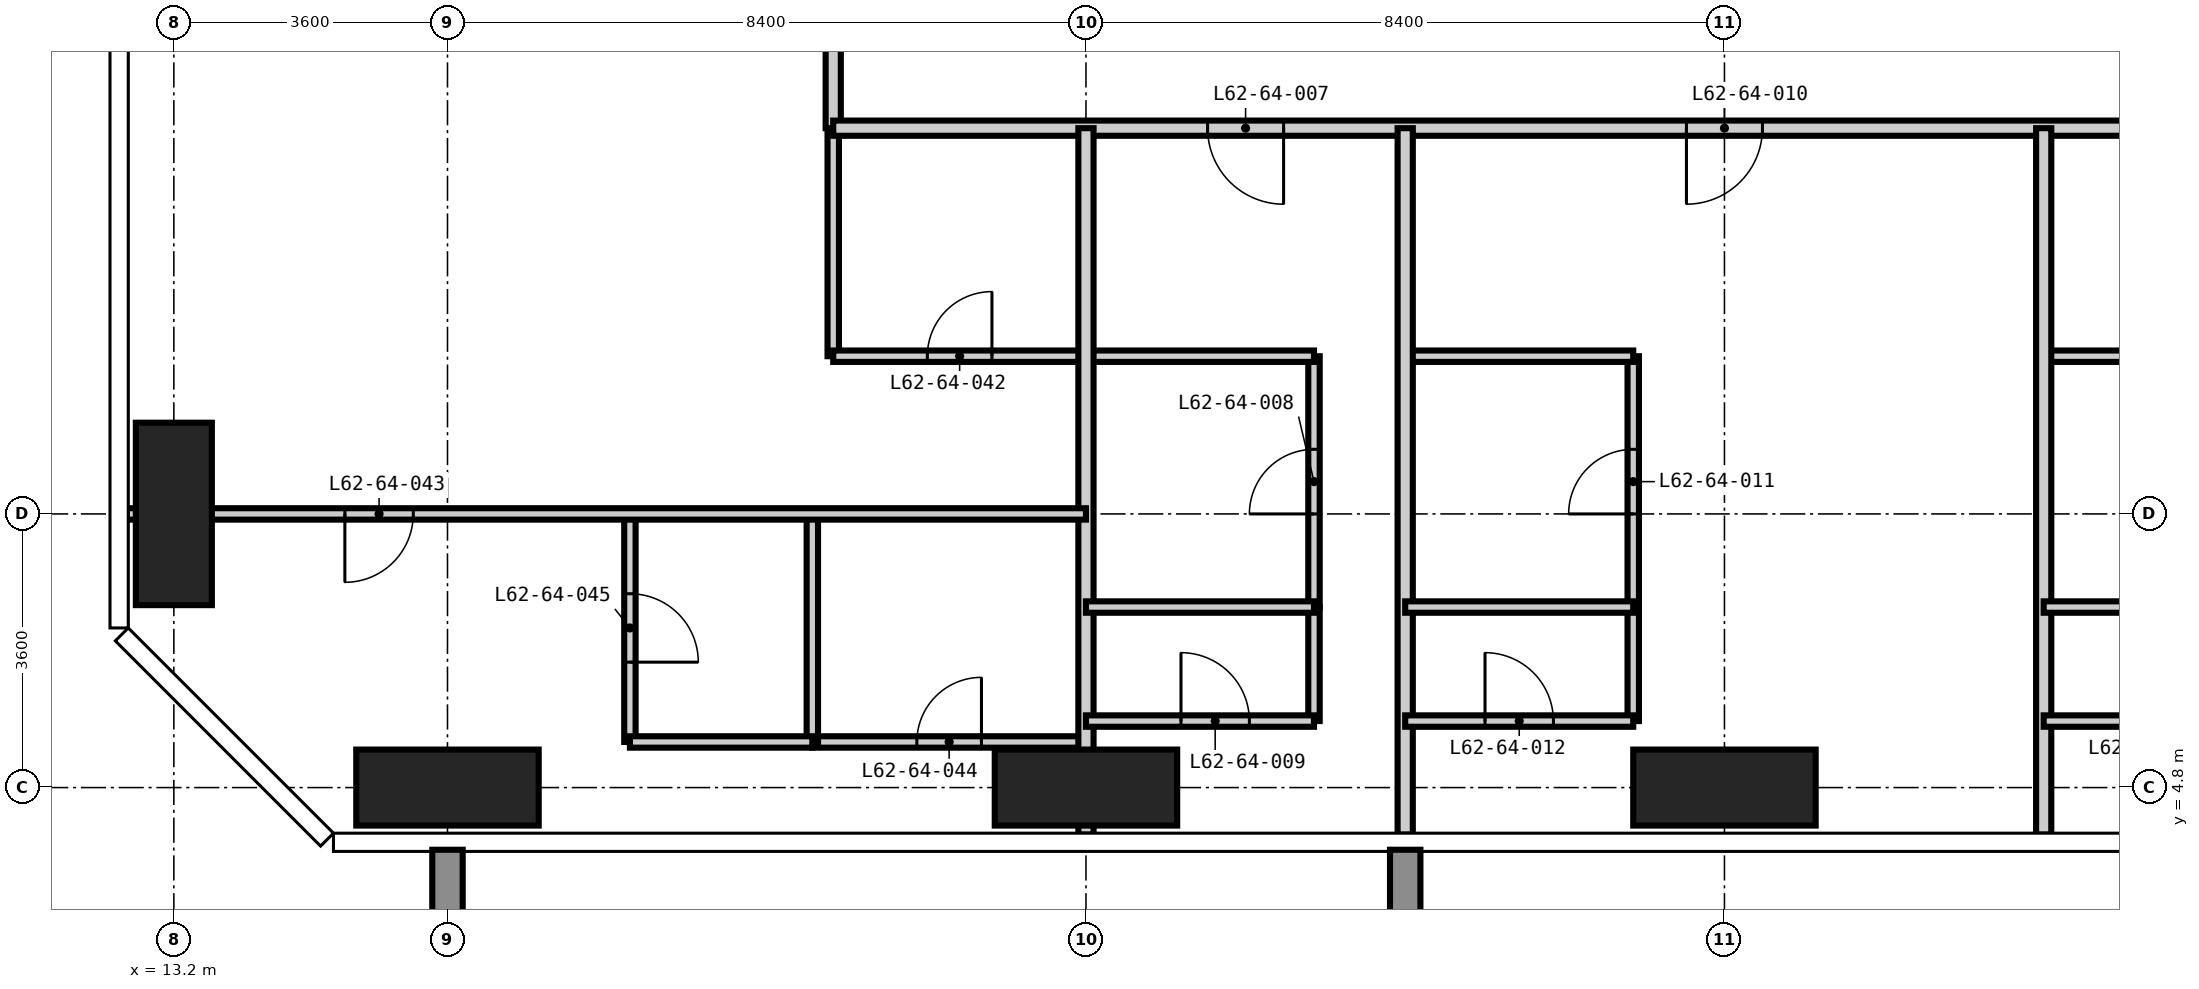
"""IFC4 building model, lengths in metres.
Left out: names, types, materials, properties, quantities, classifications, styles, units other than length and angle.
Written with IfcOpenShell. Run it as: python <this file> out.ifc"""

import sys

from ifc_helpers import new_model, si_unit, direction, frame, frame_2d, origin, origin_2d, place, context, subcontext, project, spatial, rectangle, extrude, element, fill, save


model = new_model("IFC4")
c1 = context("Model", 3, precision=1e-05, world=origin(), true_north=direction((0.0, 1.0)))
c2 = subcontext(c1, "Body", "Model", "MODEL_VIEW")
j1 = project(units=[si_unit("LENGTHUNIT", "METRE"), si_unit("PLANEANGLEUNIT", "RADIAN")], contexts=[c1])
p1 = place(None, origin())
s1 = spatial("IfcSite", under=j1, at=p1, CompositionType="ELEMENT")
p2 = place(p1, origin())
s2 = spatial("IfcBuilding", under=s1, at=p2, CompositionType="ELEMENT")
p3 = place(p2, frame((0.0, 0.0, 241.2)))
s3 = spatial("IfcBuildingStorey", under=s2, at=p3, CompositionType="ELEMENT", Elevation=241.2)
p4 = place(p3, frame((13.2, 8.4, -0.35), z_axis=(0.0, 0.0, 1.0), x_axis=(1.0, 0.0, 0.0)))
e1 = element("IfcColumn", 1, at=p4, inside=s3, PredefinedType="COLUMN", context=c2, shape_type="SweptSolid", body=[
    extrude(rectangle(XDim=1.0, YDim=2.4, at=origin_2d()), origin(), (0.0, 0.0, 1.0), 3.9),
])
for number, where, z_axis, x_axis in (
    (2, (16.8, 4.8, -0.35), (0.0, 0.0, 1.0), (1.0, 0.0, 0.0)),
    (3, (25.2, 4.8, -0.35), (0.0, 0.0, 1.0), (1.0, 0.0, 0.0)),
    (4, (33.6, 4.8, -0.35), (0.0, 0.0, 1.0), (1.0, 0.0, 0.0)),
):
    element("IfcColumn", number, at=place(p3, frame(where, z_axis=z_axis, x_axis=x_axis)), inside=s3, PredefinedType="COLUMN", context=c2, shape_type="SweptSolid", body=[
        extrude(rectangle(XDim=2.4, YDim=1.0, at=origin_2d()), origin(), (0.0, 0.0, 1.0), 3.9),
    ])
p5 = place(p3, frame((21.875, 10.475, 0.0), z_axis=(0.0, 0.0, 1.0), x_axis=(0.0, 1.0, 0.0)))
e5 = element("IfcWall", 5, at=p5, inside=s3, PredefinedType="PARTITIONING", context=c2, shape_type="SweptSolid", body=[
    extrude(rectangle(XDim=3.0, YDim=0.15, at=frame_2d((1.5, 0.0))), origin(), (0.0, 0.0, 1.0), 3.55),
])
p6 = place(p3, frame((28.2, 7.175, 0.0), z_axis=(0.0, 0.0, 1.0), x_axis=(0.0, 1.0, 0.0)))
e6 = element("IfcWall", 6, at=p6, inside=s3, PredefinedType="PARTITIONING", context=c2, shape_type="SweptSolid", body=[
    extrude(rectangle(XDim=3.3, YDim=0.15, at=frame_2d((1.65, 0.0))), origin(), (0.0, 0.0, 1.0), 3.55),
])
p7 = place(p6, frame((1.225, 0.0, 0.0)))
e7 = element("IfcOpeningElement", 7, at=p7, cuts=e6, PredefinedType="OPENING", context=c2, shape_type="SweptSolid", body=[
    extrude(rectangle(XDim=0.85, YDim=2.1, at=frame_2d((0.425, 1.05))), frame((0.0, 0.085, 0.0), z_axis=(0.0, -1.0, 0.0), x_axis=(1.0, 0.0, 0.0)), (0.0, 0.0, 1.0), 0.17),
])
p8 = place(p3, frame((32.4, 7.175, 0.0), z_axis=(0.0, 0.0, 1.0), x_axis=(0.0, 1.0, 0.0)))
e8 = element("IfcWall", 8, at=p8, inside=s3, PredefinedType="PARTITIONING", context=c2, shape_type="SweptSolid", body=[
    extrude(rectangle(XDim=3.3, YDim=0.15, at=frame_2d((1.65, 0.0))), origin(), (0.0, 0.0, 1.0), 3.55),
])
p9 = place(p8, frame((1.225, 0.0, 0.0)))
e9 = element("IfcOpeningElement", 9, at=p9, cuts=e8, PredefinedType="OPENING", context=c2, shape_type="SweptSolid", body=[
    extrude(rectangle(XDim=0.85, YDim=2.1, at=frame_2d((0.425, 1.05))), frame((0.0, 0.085, 0.0), z_axis=(0.0, -1.0, 0.0), x_axis=(1.0, 0.0, 0.0)), (0.0, 0.0, 1.0), 0.17),
])
p10 = place(p3, frame((21.6, 5.4, 0.0), z_axis=(0.0, 0.0, 1.0), x_axis=(1.0, 0.0, 0.0)))
e10 = element("IfcWall", 10, at=p10, inside=s3, PredefinedType="PARTITIONING", context=c2, shape_type="SweptSolid", body=[
    extrude(rectangle(XDim=3.6, YDim=0.15, at=frame_2d((1.8, 0.0))), origin(), (0.0, 0.0, 1.0), 3.55),
])
p11 = place(p10, frame((1.375, 0.0, 0.0)))
e11 = element("IfcOpeningElement", 11, at=p11, cuts=e10, PredefinedType="OPENING", context=c2, shape_type="SweptSolid", body=[
    extrude(rectangle(XDim=0.85, YDim=2.1, at=frame_2d((0.425, 1.05))), frame((0.0, 0.085, 0.0), z_axis=(0.0, -1.0, 0.0), x_axis=(1.0, 0.0, 0.0)), (0.0, 0.0, 1.0), 0.17),
])
p12 = place(p3, frame((21.875, 10.475, 0.0), z_axis=(0.0, 0.0, 1.0), x_axis=(1.0, 0.0, 0.0)))
e12 = element("IfcWall", 12, at=p12, inside=s3, PredefinedType="PARTITIONING", context=c2, shape_type="SweptSolid", body=[
    extrude(rectangle(XDim=6.325, YDim=0.15, at=frame_2d((3.163, 0.0))), origin(), (0.0, 0.0, 1.0), 3.55),
])
p13 = place(p12, frame((1.238, 0.0, 0.0)))
e13 = element("IfcOpeningElement", 13, at=p13, cuts=e12, PredefinedType="OPENING", context=c2, shape_type="SweptSolid", body=[
    extrude(rectangle(XDim=0.85, YDim=2.1, at=frame_2d((0.425, 1.05))), frame((0.0, 0.085, 0.0), z_axis=(0.0, -1.0, 0.0), x_axis=(1.0, 0.0, 0.0)), (0.0, 0.0, 1.0), 0.17),
])
for number, where, z_axis, x_axis in (
    (14, (29.4, 10.475, 0.0), (0.0, 0.0, 1.0), (1.0, 0.0, 0.0)),
    (15, (37.8, 10.475, 0.0), (0.0, 0.0, 1.0), (1.0, 0.0, 0.0)),
):
    element("IfcWall", number, at=place(p3, frame(where, z_axis=z_axis, x_axis=x_axis)), inside=s3, PredefinedType="PARTITIONING", context=c2, shape_type="SweptSolid", body=[
        extrude(rectangle(XDim=3.0, YDim=0.15, at=frame_2d((1.5, 0.0))), origin(), (0.0, 0.0, 1.0), 3.55),
    ])
p14 = place(p3, frame((21.875, 13.475, 0.0), z_axis=(0.0, 0.0, 1.0), x_axis=(0.0, 1.0, 0.0)))
e16 = element("IfcWall", 16, at=p14, inside=s3, PredefinedType="PARTITIONING", context=c2, shape_type="SweptSolid", body=[
    extrude(rectangle(XDim=31.25, YDim=0.2, at=frame_2d((15.625, 0.0))), origin(), (0.0, 0.0, 1.0), 3.55),
])
p15 = place(p14, frame((7.025, 0.0, 0.0)))
e17 = element("IfcOpeningElement", 17, at=p15, cuts=e16, PredefinedType="OPENING", context=c2, shape_type="SweptSolid", body=[
    extrude(rectangle(XDim=1.0, YDim=2.2, at=frame_2d((0.5, 1.1))), frame((0.0, 0.11, 0.0), z_axis=(0.0, -1.0, 0.0), x_axis=(1.0, 0.0, 0.0)), (0.0, 0.0, 1.0), 0.22),
])
p16 = place(p14, frame((15.425, 0.0, 0.0)))
e18 = element("IfcOpeningElement", 18, at=p16, cuts=e16, PredefinedType="OPENING", context=c2, shape_type="SweptSolid", body=[
    extrude(rectangle(XDim=1.0, YDim=2.2, at=frame_2d((0.5, 1.1))), frame((0.0, 0.11, 0.0), z_axis=(0.0, -1.0, 0.0), x_axis=(1.0, 0.0, 0.0)), (0.0, 0.0, 1.0), 0.22),
])
p17 = place(p14, frame((23.825, 0.0, 0.0)))
e19 = element("IfcOpeningElement", 19, at=p17, cuts=e16, PredefinedType="OPENING", context=c2, shape_type="SweptSolid", body=[
    extrude(rectangle(XDim=1.0, YDim=2.2, at=frame_2d((0.5, 1.1))), frame((0.0, 0.11, 0.0), z_axis=(0.0, -1.0, 0.0), x_axis=(1.0, 0.0, 0.0)), (0.0, 0.0, 1.0), 0.22),
])
p18 = place(p14, frame((1.162, 0.0, 0.0)))
e20 = element("IfcOpeningElement", 20, at=p18, cuts=e16, PredefinedType="OPENING", context=c2, shape_type="SweptSolid", body=[
    extrude(rectangle(XDim=1.0, YDim=2.2, at=frame_2d((0.5, 1.1))), frame((0.0, 0.11, 0.0), z_axis=(0.0, -1.0, 0.0), x_axis=(1.0, 0.0, 0.0)), (0.0, 0.0, 1.0), 0.22),
])
p19 = place(p14, frame((29.387, 0.0, 0.0)))
e21 = element("IfcOpeningElement", 21, at=p19, cuts=e16, PredefinedType="OPENING", context=c2, shape_type="SweptSolid", body=[
    extrude(rectangle(XDim=1.0, YDim=2.2, at=frame_2d((0.5, 1.1))), frame((0.0, 0.11, 0.0), z_axis=(0.0, -1.0, 0.0), x_axis=(1.0, 0.0, 0.0)), (0.0, 0.0, 1.0), 0.22),
])
p20 = place(p3, frame((44.125, 13.475, 0.0), z_axis=(0.0, 0.0, 1.0), x_axis=(-1.0, 0.0, 0.0)))
e22 = element("IfcWall", 22, at=p20, inside=s3, PredefinedType="PARTITIONING", context=c2, shape_type="SweptSolid", body=[
    extrude(rectangle(XDim=22.25, YDim=0.2, at=frame_2d((11.125, 0.0))), origin(), (0.0, 0.0, 1.0), 3.55),
])
p21 = place(p20, frame((16.325, 0.0, 0.0)))
e23 = element("IfcOpeningElement", 23, at=p21, cuts=e22, PredefinedType="OPENING", context=c2, shape_type="SweptSolid", body=[
    extrude(rectangle(XDim=1.0, YDim=2.2, at=frame_2d((0.5, 1.1))), frame((0.0, 0.11, 0.0), z_axis=(0.0, -1.0, 0.0), x_axis=(1.0, 0.0, 0.0)), (0.0, 0.0, 1.0), 0.22),
])
p22 = place(p20, frame((10.025, 0.0, 0.0)))
e24 = element("IfcOpeningElement", 24, at=p22, cuts=e22, PredefinedType="OPENING", context=c2, shape_type="SweptSolid", body=[
    extrude(rectangle(XDim=1.0, YDim=2.2, at=frame_2d((0.5, 1.1))), frame((0.0, 0.11, 0.0), z_axis=(0.0, -1.0, 0.0), x_axis=(1.0, 0.0, 0.0)), (0.0, 0.0, 1.0), 0.22),
])
p23 = place(p20, frame((3.725, 0.0, 0.0)))
e25 = element("IfcOpeningElement", 25, at=p23, cuts=e22, PredefinedType="OPENING", context=c2, shape_type="SweptSolid", body=[
    extrude(rectangle(XDim=1.0, YDim=2.2, at=frame_2d((0.5, 1.1))), frame((0.0, 0.11, 0.0), z_axis=(0.0, -1.0, 0.0), x_axis=(1.0, 0.0, 0.0)), (0.0, 0.0, 1.0), 0.22),
])
for number, where, z_axis, x_axis in (
    (26, (25.2, 4.182, 0.0), (0.0, 0.0, 1.0), (0.0, 1.0, 0.0)),
    (27, (29.4, 4.182, 0.0), (0.0, 0.0, 1.0), (0.0, 1.0, 0.0)),
    (28, (37.8, 4.182, 0.0), (0.0, 0.0, 1.0), (0.0, 1.0, 0.0)),
):
    element("IfcWall", number, at=place(p3, frame(where, z_axis=z_axis, x_axis=x_axis)), inside=s3, PredefinedType="PARTITIONING", context=c2, shape_type="SweptSolid", body=[
        extrude(rectangle(XDim=9.293, YDim=0.2, at=frame_2d((4.646, 0.0))), origin(), (0.0, 0.0, 1.0), 3.55),
    ])
p24 = place(p3, frame((19.2, 5.4, 0.0), z_axis=(0.0, 0.0, 1.0), x_axis=(0.0, 1.0, 0.0)))
e29 = element("IfcWall", 29, at=p24, inside=s3, PredefinedType="PARTITIONING", context=c2, shape_type="SweptSolid", body=[
    extrude(rectangle(XDim=3.0, YDim=0.15, at=frame_2d((1.5, 0.0))), origin(), (0.0, 0.0, 1.0), 3.55),
])
p25 = place(p24, frame((1.05, 0.0, 0.0)))
e30 = element("IfcOpeningElement", 30, at=p25, cuts=e29, PredefinedType="OPENING", context=c2, shape_type="SweptSolid", body=[
    extrude(rectangle(XDim=0.9, YDim=2.1, at=frame_2d((0.45, 1.05))), frame((0.0, 0.085, 0.0), z_axis=(0.0, -1.0, 0.0), x_axis=(1.0, 0.0, 0.0)), (0.0, 0.0, 1.0), 0.17),
])
p26 = place(p3, frame((21.6, 5.4, 0.0), z_axis=(0.0, 0.0, 1.0), x_axis=(0.0, 1.0, 0.0)))
e31 = element("IfcWall", 31, at=p26, inside=s3, PredefinedType="PARTITIONING", context=c2, shape_type="SweptSolid", body=[
    extrude(rectangle(XDim=3.0, YDim=0.15, at=frame_2d((1.5, 0.0))), origin(), (0.0, 0.0, 1.0), 3.55),
])
for number, where, z_axis, x_axis in (
    (32, (28.2, 5.675, 0.0), (0.0, 0.0, 1.0), (0.0, 1.0, 0.0)),
    (33, (32.4, 5.675, 0.0), (0.0, 0.0, 1.0), (0.0, 1.0, 0.0)),
):
    element("IfcWall", number, at=place(p3, frame(where, z_axis=z_axis, x_axis=x_axis)), inside=s3, PredefinedType="PARTITIONING", context=c2, shape_type="SweptSolid", body=[
        extrude(rectangle(XDim=1.5, YDim=0.15, at=frame_2d((0.75, 0.0))), origin(), (0.0, 0.0, 1.0), 3.55),
    ])
p27 = place(p3, frame((19.2, 5.4, 0.0), z_axis=(0.0, 0.0, 1.0), x_axis=(1.0, 0.0, 0.0)))
e34 = element("IfcWall", 34, at=p27, inside=s3, PredefinedType="PARTITIONING", context=c2, shape_type="SweptSolid", body=[
    extrude(rectangle(XDim=2.4, YDim=0.15, at=frame_2d((1.2, 0.0))), origin(), (0.0, 0.0, 1.0), 3.55),
])
p28 = place(p3, frame((25.2, 5.675, 0.0), z_axis=(0.0, 0.0, 1.0), x_axis=(1.0, 0.0, 0.0)))
e35 = element("IfcWall", 35, at=p28, inside=s3, PredefinedType="PARTITIONING", context=c2, shape_type="SweptSolid", body=[
    extrude(rectangle(XDim=3.0, YDim=0.15, at=frame_2d((1.5, 0.0))), origin(), (0.0, 0.0, 1.0), 3.55),
])
p29 = place(p28, frame((1.25, 0.0, 0.0)))
e36 = element("IfcOpeningElement", 36, at=p29, cuts=e35, PredefinedType="OPENING", context=c2, shape_type="SweptSolid", body=[
    extrude(rectangle(XDim=0.9, YDim=2.1, at=frame_2d((0.45, 1.05))), frame((0.0, 0.085, 0.0), z_axis=(0.0, -1.0, 0.0), x_axis=(1.0, 0.0, 0.0)), (0.0, 0.0, 1.0), 0.17),
])
p30 = place(p3, frame((29.4, 5.675, 0.0), z_axis=(0.0, 0.0, 1.0), x_axis=(1.0, 0.0, 0.0)))
e37 = element("IfcWall", 37, at=p30, inside=s3, PredefinedType="PARTITIONING", context=c2, shape_type="SweptSolid", body=[
    extrude(rectangle(XDim=3.0, YDim=0.15, at=frame_2d((1.5, 0.0))), origin(), (0.0, 0.0, 1.0), 3.55),
])
p31 = place(p30, frame((1.05, 0.0, 0.0)))
e38 = element("IfcOpeningElement", 38, at=p31, cuts=e37, PredefinedType="OPENING", context=c2, shape_type="SweptSolid", body=[
    extrude(rectangle(XDim=0.9, YDim=2.1, at=frame_2d((0.45, 1.05))), frame((0.0, 0.085, 0.0), z_axis=(0.0, -1.0, 0.0), x_axis=(1.0, 0.0, 0.0)), (0.0, 0.0, 1.0), 0.17),
])
p32 = place(p3, frame((37.8, 5.675, 0.0), z_axis=(0.0, 0.0, 1.0), x_axis=(1.0, 0.0, 0.0)))
e39 = element("IfcWall", 39, at=p32, inside=s3, PredefinedType="PARTITIONING", context=c2, shape_type="SweptSolid", body=[
    extrude(rectangle(XDim=3.0, YDim=0.15, at=frame_2d((1.5, 0.0))), origin(), (0.0, 0.0, 1.0), 3.55),
])
p33 = place(p32, frame((1.05, 0.0, 0.0)))
e40 = element("IfcOpeningElement", 40, at=p33, cuts=e39, PredefinedType="OPENING", context=c2, shape_type="SweptSolid", body=[
    extrude(rectangle(XDim=0.9, YDim=2.1, at=frame_2d((0.45, 1.05))), frame((0.0, 0.085, 0.0), z_axis=(0.0, -1.0, 0.0), x_axis=(1.0, 0.0, 0.0)), (0.0, 0.0, 1.0), 0.17),
])
for number, where, z_axis, x_axis in (
    (41, (25.2, 7.175, 0.0), (0.0, 0.0, 1.0), (1.0, 0.0, 0.0)),
    (42, (29.4, 7.175, 0.0), (0.0, 0.0, 1.0), (1.0, 0.0, 0.0)),
    (43, (37.8, 7.175, 0.0), (0.0, 0.0, 1.0), (1.0, 0.0, 0.0)),
):
    element("IfcWall", number, at=place(p3, frame(where, z_axis=z_axis, x_axis=x_axis)), inside=s3, PredefinedType="PARTITIONING", context=c2, shape_type="SweptSolid", body=[
        extrude(rectangle(XDim=3.0, YDim=0.15, at=frame_2d((1.5, 0.0))), origin(), (0.0, 0.0, 1.0), 3.55),
    ])
p34 = place(p3, frame((12.582, 8.4, 0.0), z_axis=(0.0, 0.0, 1.0), x_axis=(1.0, 0.0, 0.0)))
e44 = element("IfcWall", 44, at=p34, inside=s3, PredefinedType="PARTITIONING", context=c2, shape_type="SweptSolid", body=[
    extrude(rectangle(XDim=12.618, YDim=0.15, at=frame_2d((6.309, 0.0))), origin(), (0.0, 0.0, 1.0), 3.55),
])
p35 = place(p34, frame((2.868, 0.0, 0.0)))
e45 = element("IfcOpeningElement", 45, at=p35, cuts=e44, PredefinedType="OPENING", context=c2, shape_type="SweptSolid", body=[
    extrude(rectangle(XDim=0.9, YDim=2.1, at=frame_2d((0.45, 1.05))), frame((0.0, 0.085, 0.0), z_axis=(0.0, -1.0, 0.0), x_axis=(1.0, 0.0, 0.0)), (0.0, 0.0, 1.0), 0.17),
])
p36 = place(p21, origin())
e46 = element("IfcDoor", 46, at=p36, inside=s3, OperationType="SINGLE_SWING_LEFT", PredefinedType="DOOR", context=c2, shape_type="SweptSolid", body=[
    extrude(rectangle(XDim=1.0, YDim=2.2, at=frame_2d((0.5, 1.1))), frame((0.0, 0.025, 0.0), z_axis=(0.0, -1.0, 0.0), x_axis=(1.0, 0.0, 0.0)), (0.0, 0.0, 1.0), 0.05),
])
fill(e23, e46)
p37 = place(p7, origin())
e47 = element("IfcDoor", 47, at=p37, inside=s3, OperationType="SINGLE_SWING_LEFT", PredefinedType="DOOR", context=c2, shape_type="SweptSolid", body=[
    extrude(rectangle(XDim=0.85, YDim=2.1, at=frame_2d((0.425, 1.05))), frame((0.0, 0.025, 0.0), z_axis=(0.0, -1.0, 0.0), x_axis=(1.0, 0.0, 0.0)), (0.0, 0.0, 1.0), 0.05),
])
fill(e7, e47)
p38 = place(p29, origin())
e48 = element("IfcDoor", 48, at=p38, inside=s3, OperationType="SINGLE_SWING_LEFT", PredefinedType="DOOR", context=c2, shape_type="SweptSolid", body=[
    extrude(rectangle(XDim=0.9, YDim=2.1, at=frame_2d((0.45, 1.05))), frame((0.0, 0.025, 0.0), z_axis=(0.0, -1.0, 0.0), x_axis=(1.0, 0.0, 0.0)), (0.0, 0.0, 1.0), 0.05),
])
fill(e36, e48)
p39 = place(p22, origin())
e49 = element("IfcDoor", 49, at=p39, inside=s3, OperationType="SINGLE_SWING_RIGHT", PredefinedType="DOOR", context=c2, shape_type="SweptSolid", body=[
    extrude(rectangle(XDim=1.0, YDim=2.2, at=frame_2d((0.5, 1.1))), frame((0.0, 0.025, 0.0), z_axis=(0.0, -1.0, 0.0), x_axis=(1.0, 0.0, 0.0)), (0.0, 0.0, 1.0), 0.05),
])
fill(e24, e49)
p40 = place(p9, origin())
e50 = element("IfcDoor", 50, at=p40, inside=s3, OperationType="SINGLE_SWING_LEFT", PredefinedType="DOOR", context=c2, shape_type="SweptSolid", body=[
    extrude(rectangle(XDim=0.85, YDim=2.1, at=frame_2d((0.425, 1.05))), frame((0.0, 0.025, 0.0), z_axis=(0.0, -1.0, 0.0), x_axis=(1.0, 0.0, 0.0)), (0.0, 0.0, 1.0), 0.05),
])
fill(e9, e50)
p41 = place(p31, origin())
e51 = element("IfcDoor", 51, at=p41, inside=s3, OperationType="SINGLE_SWING_LEFT", PredefinedType="DOOR", context=c2, shape_type="SweptSolid", body=[
    extrude(rectangle(XDim=0.9, YDim=2.1, at=frame_2d((0.45, 1.05))), frame((0.0, 0.025, 0.0), z_axis=(0.0, -1.0, 0.0), x_axis=(1.0, 0.0, 0.0)), (0.0, 0.0, 1.0), 0.05),
])
fill(e38, e51)
p42 = place(p13, origin())
e52 = element("IfcDoor", 52, at=p42, inside=s3, OperationType="SINGLE_SWING_RIGHT", PredefinedType="DOOR", context=c2, shape_type="SweptSolid", body=[
    extrude(rectangle(XDim=0.85, YDim=2.1, at=frame_2d((0.425, 1.05))), frame((0.0, 0.025, 0.0), z_axis=(0.0, -1.0, 0.0), x_axis=(1.0, 0.0, 0.0)), (0.0, 0.0, 1.0), 0.05),
])
fill(e13, e52)
p43 = place(p35, frame((0.9, 0.0, 0.0), z_axis=(0.0, 0.0, 1.0), x_axis=(-1.0, 0.0, 0.0)))
e53 = element("IfcDoor", 53, at=p43, inside=s3, OperationType="SINGLE_SWING_RIGHT", PredefinedType="DOOR", context=c2, shape_type="SweptSolid", body=[
    extrude(rectangle(XDim=0.9, YDim=2.1, at=frame_2d((0.45, 1.05))), frame((0.0, 0.025, 0.0), z_axis=(0.0, -1.0, 0.0), x_axis=(1.0, 0.0, 0.0)), (0.0, 0.0, 1.0), 0.05),
])
fill(e45, e53)
p44 = place(p11, origin())
e54 = element("IfcDoor", 54, at=p44, inside=s3, OperationType="SINGLE_SWING_RIGHT", PredefinedType="DOOR", context=c2, shape_type="SweptSolid", body=[
    extrude(rectangle(XDim=0.85, YDim=2.1, at=frame_2d((0.425, 1.05))), frame((0.0, 0.025, 0.0), z_axis=(0.0, -1.0, 0.0), x_axis=(1.0, 0.0, 0.0)), (0.0, 0.0, 1.0), 0.05),
])
fill(e11, e54)
p45 = place(p25, frame((0.9, 0.0, 0.0), z_axis=(0.0, 0.0, 1.0), x_axis=(-1.0, 0.0, 0.0)))
e55 = element("IfcDoor", 55, at=p45, inside=s3, OperationType="SINGLE_SWING_RIGHT", PredefinedType="DOOR", context=c2, shape_type="SweptSolid", body=[
    extrude(rectangle(XDim=0.9, YDim=2.1, at=frame_2d((0.45, 1.05))), frame((0.0, 0.025, 0.0), z_axis=(0.0, -1.0, 0.0), x_axis=(1.0, 0.0, 0.0)), (0.0, 0.0, 1.0), 0.05),
])
fill(e30, e55)
save(model, sys.argv[1])
